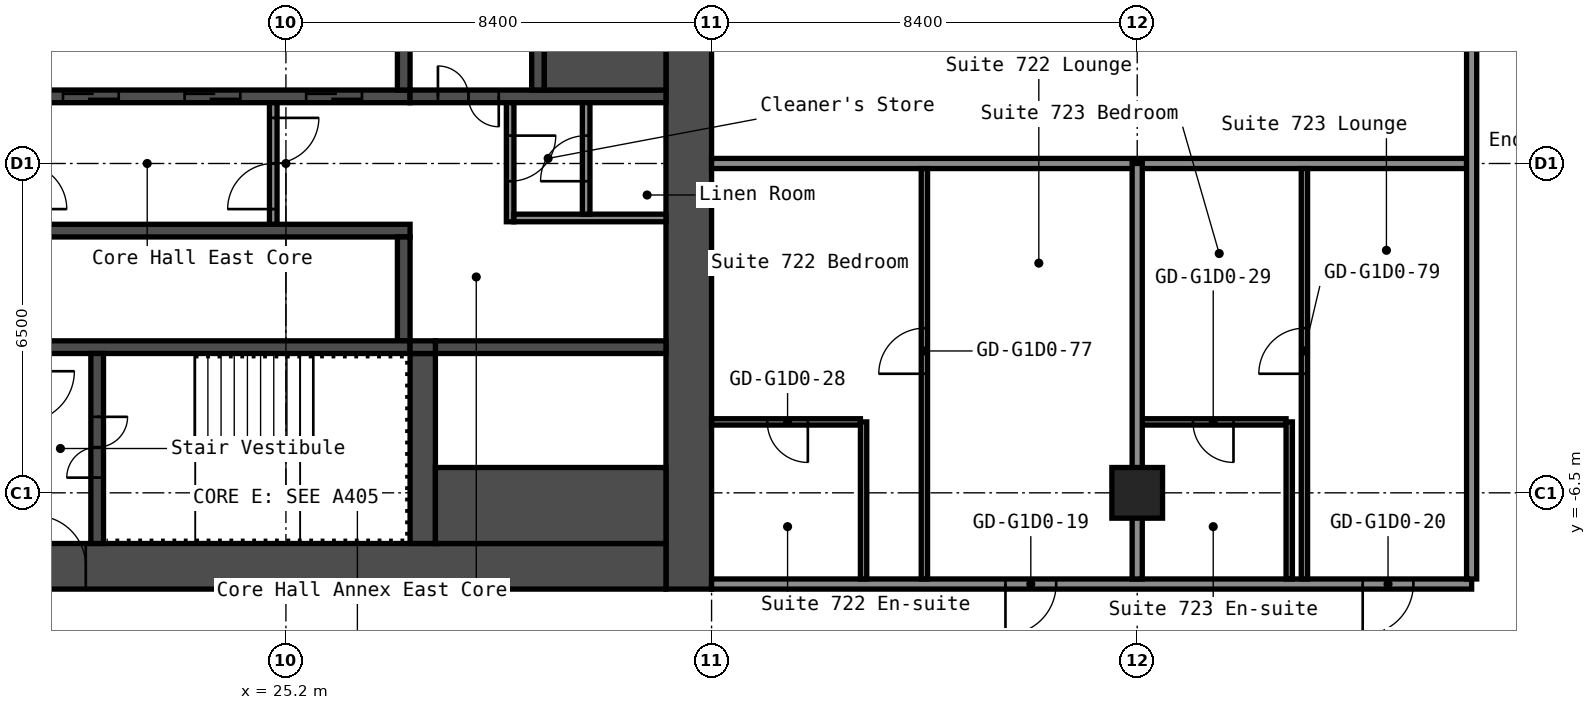
"""IFC4 building model, lengths in metres.
Left out: names, types, materials, properties, quantities, classifications, styles, units other than length and angle.
Written with IfcOpenShell. Run it as: python <this file> out.ifc"""

import sys

from ifc_helpers import new_model, si_unit, direction, frame, frame_2d, origin, origin_2d, place, context, subcontext, project, spatial, rectangle, hollow_rectangle, extrude, element, fill, save


model = new_model("IFC4")
c1 = context("Model", 3, precision=1e-05, world=origin(), true_north=direction((0.0, 1.0)))
c2 = subcontext(c1, "Body", "Model", "MODEL_VIEW")
j1 = project(units=[si_unit("LENGTHUNIT", "METRE"), si_unit("PLANEANGLEUNIT", "RADIAN")], contexts=[c1])
p1 = place(None, origin())
s1 = spatial("IfcSite", under=j1, at=p1, CompositionType="ELEMENT")
p2 = place(p1, origin())
s2 = spatial("IfcBuilding", under=s1, at=p2, CompositionType="ELEMENT")
p3 = place(p2, frame((0.0, 0.0, 29.4)))
s3 = spatial("IfcBuildingStorey", under=s2, at=p3, CompositionType="ELEMENT", Elevation=29.4)
p4 = place(p3, frame((42.0, -6.5, 0.0), z_axis=(0.0, 0.0, 1.0), x_axis=(1.0, 0.0, 0.0)))
e1 = element("IfcColumn", 1, at=p4, inside=s3, PredefinedType="COLUMN", context=c2, shape_type="SweptSolid", body=[
    extrude(hollow_rectangle(XDim=1.0, YDim=1.0, WallThickness=0.04, at=origin_2d()), origin(), (0.0, 0.0, 1.0), 2.8),
])
p5 = place(p3, frame((33.15, -8.4, 0.0), z_axis=(0.0, 0.0, 1.0), x_axis=(0.0, 1.0, 0.0)))
e2 = element("IfcWall", 2, at=p5, inside=s3, PredefinedType="SHEAR", context=c2, shape_type="SweptSolid", body=[
    extrude(rectangle(XDim=16.8, YDim=0.9, at=frame_2d((8.4, 0.0))), origin(), (0.0, 0.0, 1.0), 2.8),
])
p6 = place(p3, frame((17.7, -7.95, 0.0), z_axis=(0.0, 0.0, 1.0), x_axis=(1.0, 0.0, 0.0)))
e3 = element("IfcWall", 3, at=p6, inside=s3, PredefinedType="SHEAR", context=c2, shape_type="SweptSolid", body=[
    extrude(rectangle(XDim=15.0, YDim=0.9, at=frame_2d((7.5, 0.0))), origin(), (0.0, 0.0, 1.0), 2.8),
])
p7 = place(p6, frame((2.55, 0.0, 0.0)))
e4 = element("IfcOpeningElement", 4, at=p7, cuts=e3, PredefinedType="OPENING", context=c2, shape_type="SweptSolid", body=[
    extrude(rectangle(XDim=1.0, YDim=2.1, at=frame_2d((0.5, 1.05))), frame((0.0, 0.46, 0.0), z_axis=(0.0, -1.0, 0.0), x_axis=(1.0, 0.0, 0.0)), (0.0, 0.0, 1.0), 0.92),
])
p8 = place(p3, frame((20.15, 1.325, 0.0), z_axis=(0.0, 0.0, 1.0), x_axis=(1.0, 0.0, 0.0)))
e5 = element("IfcWall", 5, at=p8, inside=s3, PredefinedType="SHEAR", context=c2, shape_type="SweptSolid", body=[
    extrude(rectangle(XDim=7.5, YDim=0.25, at=frame_2d((3.75, 0.0))), origin(), (0.0, 0.0, 1.0), 2.8),
])
p9 = place(p8, frame((0.65, 0.0, 0.0)))
e6 = element("IfcOpeningElement", 6, at=p9, cuts=e5, PredefinedType="OPENING", context=c2, shape_type="SweptSolid", body=[
    extrude(rectangle(XDim=1.1, YDim=2.1, at=frame_2d((0.55, 1.05))), frame((0.0, 0.135, 0.0), z_axis=(0.0, -1.0, 0.0), x_axis=(1.0, 0.0, 0.0)), (0.0, 0.0, 1.0), 0.27),
])
p10 = place(p8, frame((3.05, 0.0, 0.0)))
e7 = element("IfcOpeningElement", 7, at=p10, cuts=e5, PredefinedType="OPENING", context=c2, shape_type="SweptSolid", body=[
    extrude(rectangle(XDim=1.1, YDim=2.1, at=frame_2d((0.55, 1.05))), frame((0.0, 0.135, 0.0), z_axis=(0.0, -1.0, 0.0), x_axis=(1.0, 0.0, 0.0)), (0.0, 0.0, 1.0), 0.27),
])
p11 = place(p8, frame((5.45, 0.0, 0.0)))
e8 = element("IfcOpeningElement", 8, at=p11, cuts=e5, PredefinedType="OPENING", context=c2, shape_type="SweptSolid", body=[
    extrude(rectangle(XDim=1.1, YDim=2.1, at=frame_2d((0.55, 1.05))), frame((0.0, 0.135, 0.0), z_axis=(0.0, -1.0, 0.0), x_axis=(1.0, 0.0, 0.0)), (0.0, 0.0, 1.0), 0.27),
])
p12 = place(p3, frame((27.525, 1.45, 0.0), z_axis=(0.0, 0.0, 1.0), x_axis=(0.0, 1.0, 0.0)))
e9 = element("IfcWall", 9, at=p12, inside=s3, PredefinedType="SHEAR", context=c2, shape_type="SweptSolid", body=[
    extrude(rectangle(XDim=2.05, YDim=0.25, at=frame_2d((1.025, 0.0))), origin(), (0.0, 0.0, 1.0), 2.8),
])
p13 = place(p3, frame((27.65, 1.325, 0.0), z_axis=(0.0, 0.0, 1.0), x_axis=(1.0, 0.0, 0.0)))
e10 = element("IfcWall", 10, at=p13, inside=s3, PredefinedType="SHEAR", context=c2, shape_type="SweptSolid", body=[
    extrude(rectangle(XDim=5.05, YDim=0.25, at=frame_2d((2.525, 0.0))), origin(), (0.0, 0.0, 1.0), 2.8),
])
p14 = place(p13, frame((0.55, 0.0, 0.0)))
e11 = element("IfcOpeningElement", 11, at=p14, cuts=e10, PredefinedType="OPENING", context=c2, shape_type="SweptSolid", body=[
    extrude(rectangle(XDim=1.2, YDim=2.1, at=frame_2d((0.6, 1.05))), frame((0.0, 0.135, 0.0), z_axis=(0.0, -1.0, 0.0), x_axis=(1.0, 0.0, 0.0)), (0.0, 0.0, 1.0), 0.27),
])
p15 = place(p3, frame((30.175, 1.45, 0.0), z_axis=(0.0, 0.0, 1.0), x_axis=(0.0, 1.0, 0.0)))
e12 = element("IfcWall", 12, at=p15, inside=s3, PredefinedType="SHEAR", context=c2, shape_type="SweptSolid", body=[
    extrude(rectangle(XDim=6.05, YDim=0.25, at=frame_2d((3.025, 0.0))), origin(), (0.0, 0.0, 1.0), 2.8),
])
p16 = place(p15, frame((2.625, 0.0, 0.0)))
e13 = element("IfcOpeningElement", 13, at=p16, cuts=e12, PredefinedType="OPENING", context=c2, shape_type="SweptSolid", body=[
    extrude(rectangle(XDim=1.1, YDim=2.1, at=frame_2d((0.55, 1.05))), frame((0.0, 0.135, 0.0), z_axis=(0.0, -1.0, 0.0), x_axis=(1.0, 0.0, 0.0)), (0.0, 0.0, 1.0), 0.27),
])
p17 = place(p3, frame((30.3, 2.375, 0.0), z_axis=(0.0, 0.0, 1.0), x_axis=(1.0, 0.0, 0.0)))
e14 = element("IfcWall", 14, at=p17, inside=s3, PredefinedType="SHEAR", context=c2, shape_type="SweptSolid", body=[
    extrude(rectangle(XDim=2.4, YDim=1.85, at=frame_2d((1.2, 0.0))), origin(), (0.0, 0.0, 1.0), 2.8),
])
p18 = place(p3, frame((20.15, -1.325, 0.0), z_axis=(0.0, 0.0, 1.0), x_axis=(1.0, 0.0, 0.0)))
e15 = element("IfcWall", 15, at=p18, inside=s3, PredefinedType="SHEAR", context=c2, shape_type="SweptSolid", body=[
    extrude(rectangle(XDim=7.5, YDim=0.25, at=frame_2d((3.75, 0.0))), origin(), (0.0, 0.0, 1.0), 2.8),
])
p19 = place(p3, frame((27.525, -3.5, 0.0), z_axis=(0.0, 0.0, 1.0), x_axis=(0.0, 1.0, 0.0)))
e16 = element("IfcWall", 16, at=p19, inside=s3, PredefinedType="SHEAR", context=c2, shape_type="SweptSolid", body=[
    extrude(rectangle(XDim=2.05, YDim=0.25, at=frame_2d((1.025, 0.0))), origin(), (0.0, 0.0, 1.0), 2.8),
])
p20 = place(p3, frame((20.15, -3.625, 0.0), z_axis=(0.0, 0.0, 1.0), x_axis=(1.0, 0.0, 0.0)))
e17 = element("IfcWall", 17, at=p20, inside=s3, PredefinedType="SHEAR", context=c2, shape_type="SweptSolid", body=[
    extrude(rectangle(XDim=7.5, YDim=0.25, at=frame_2d((3.75, 0.0))), origin(), (0.0, 0.0, 1.0), 2.8),
])
p21 = place(p3, frame((21.475, -7.5, 0.0), z_axis=(0.0, 0.0, 1.0), x_axis=(0.0, 1.0, 0.0)))
e18 = element("IfcWall", 18, at=p21, inside=s3, PredefinedType="SHEAR", context=c2, shape_type="SweptSolid", body=[
    extrude(rectangle(XDim=3.75, YDim=0.25, at=frame_2d((1.875, 0.0))), origin(), (0.0, 0.0, 1.0), 2.8),
])
p22 = place(p21, frame((1.3, 0.0, 0.0)))
e19 = element("IfcOpeningElement", 19, at=p22, cuts=e18, PredefinedType="OPENING", context=c2, shape_type="SweptSolid", body=[
    extrude(rectangle(XDim=1.2, YDim=2.1, at=frame_2d((0.6, 1.05))), frame((0.0, 0.135, 0.0), z_axis=(0.0, -1.0, 0.0), x_axis=(1.0, 0.0, 0.0)), (0.0, 0.0, 1.0), 0.27),
])
p23 = place(p3, frame((27.9, -7.5, 0.0), z_axis=(0.0, 0.0, 1.0), x_axis=(0.0, 1.0, 0.0)))
e20 = element("IfcWall", 20, at=p23, inside=s3, PredefinedType="SHEAR", context=c2, shape_type="SweptSolid", body=[
    extrude(rectangle(XDim=3.75, YDim=0.5, at=frame_2d((1.875, 0.0))), origin(), (0.0, 0.0, 1.0), 2.8),
])
p24 = place(p3, frame((28.15, -3.625, 0.0), z_axis=(0.0, 0.0, 1.0), x_axis=(1.0, 0.0, 0.0)))
e21 = element("IfcWall", 21, at=p24, inside=s3, PredefinedType="SHEAR", context=c2, shape_type="SweptSolid", body=[
    extrude(rectangle(XDim=4.55, YDim=0.25, at=frame_2d((2.275, 0.0))), origin(), (0.0, 0.0, 1.0), 2.8),
])
p25 = place(p3, frame((28.15, -6.75, 0.0), z_axis=(0.0, 0.0, 1.0), x_axis=(1.0, 0.0, 0.0)))
e22 = element("IfcWall", 22, at=p25, inside=s3, PredefinedType="SHEAR", context=c2, shape_type="SweptSolid", body=[
    extrude(rectangle(XDim=4.55, YDim=1.5, at=frame_2d((2.275, 0.0))), origin(), (0.0, 0.0, 1.0), 2.8),
])
p26 = place(p3, frame((27.65, -3.625, 0.0), z_axis=(0.0, 0.0, 1.0), x_axis=(1.0, 0.0, 0.0)))
e23 = element("IfcWall", 23, at=p26, inside=s3, PredefinedType="SHEAR", context=c2, shape_type="SweptSolid", body=[
    extrude(rectangle(XDim=0.5, YDim=0.25, at=frame_2d((0.25, 0.0))), origin(), (0.0, 0.0, 1.0), 2.8),
])
p27 = place(p3, frame((24.95, -1.2, 0.0), z_axis=(0.0, 0.0, 1.0), x_axis=(0.0, 1.0, 0.0)))
e24 = element("IfcWall", 24, at=p27, inside=s3, PredefinedType="PARTITIONING", context=c2, shape_type="SweptSolid", body=[
    extrude(rectangle(XDim=2.4, YDim=0.15, at=frame_2d((1.2, 0.0))), origin(), (0.0, 0.0, 1.0), 2.8),
])
p28 = place(p27, frame((0.3, 0.0, 0.0)))
e25 = element("IfcOpeningElement", 25, at=p28, cuts=e24, PredefinedType="OPENING", context=c2, shape_type="SweptSolid", body=[
    extrude(rectangle(XDim=1.8, YDim=2.1, at=frame_2d((0.9, 1.05))), frame((0.0, 0.085, 0.0), z_axis=(0.0, -1.0, 0.0), x_axis=(1.0, 0.0, 0.0)), (0.0, 0.0, 1.0), 0.17),
])
p29 = place(p3, frame((29.625, -1.15, 0.0), z_axis=(0.0, 0.0, 1.0), x_axis=(0.0, 1.0, 0.0)))
e26 = element("IfcWall", 26, at=p29, inside=s3, PredefinedType="PARTITIONING", context=c2, shape_type="SweptSolid", body=[
    extrude(rectangle(XDim=2.35, YDim=0.15, at=frame_2d((1.175, 0.0))), origin(), (0.0, 0.0, 1.0), 2.8),
])
p30 = place(p29, frame((0.8, 0.0, 0.0)))
e27 = element("IfcOpeningElement", 27, at=p30, cuts=e26, PredefinedType="OPENING", context=c2, shape_type="SweptSolid", body=[
    extrude(rectangle(XDim=0.9, YDim=2.1, at=frame_2d((0.45, 1.05))), frame((0.0, 0.085, 0.0), z_axis=(0.0, -1.0, 0.0), x_axis=(1.0, 0.0, 0.0)), (0.0, 0.0, 1.0), 0.17),
])
p31 = place(p3, frame((29.7, -1.075, 0.0), z_axis=(0.0, 0.0, 1.0), x_axis=(1.0, 0.0, 0.0)))
e28 = element("IfcWall", 28, at=p31, inside=s3, PredefinedType="PARTITIONING", context=c2, shape_type="SweptSolid", body=[
    extrude(rectangle(XDim=3.0, YDim=0.15, at=frame_2d((1.5, 0.0))), origin(), (0.0, 0.0, 1.0), 2.8),
])
p32 = place(p3, frame((31.125, -1.0, 0.0), z_axis=(0.0, 0.0, 1.0), x_axis=(0.0, 1.0, 0.0)))
e29 = element("IfcWall", 29, at=p32, inside=s3, PredefinedType="PARTITIONING", context=c2, shape_type="SweptSolid", body=[
    extrude(rectangle(XDim=2.2, YDim=0.15, at=frame_2d((1.1, 0.0))), origin(), (0.0, 0.0, 1.0), 2.8),
])
p33 = place(p32, frame((0.65, 0.0, 0.0)))
e30 = element("IfcOpeningElement", 30, at=p33, cuts=e29, PredefinedType="OPENING", context=c2, shape_type="SweptSolid", body=[
    extrude(rectangle(XDim=0.9, YDim=2.1, at=frame_2d((0.45, 1.05))), frame((0.0, 0.085, 0.0), z_axis=(0.0, -1.0, 0.0), x_axis=(1.0, 0.0, 0.0)), (0.0, 0.0, 1.0), 0.17),
])
p34 = place(p3, frame((33.6, -8.3, 0.0), z_axis=(0.0, 0.0, 1.0), x_axis=(1.0, 0.0, 0.0)))
e31 = element("IfcWall", 31, at=p34, inside=s3, PredefinedType="PARTITIONING", context=c2, shape_type="SweptSolid", body=[
    extrude(rectangle(XDim=15.0, YDim=0.2, at=frame_2d((7.5, 0.0))), origin(), (0.0, 0.0, 1.0), 2.8),
])
p35 = place(p34, frame((5.8, 0.0, 0.0)))
e32 = element("IfcOpeningElement", 32, at=p35, cuts=e31, PredefinedType="OPENING", context=c2, shape_type="SweptSolid", body=[
    extrude(rectangle(XDim=1.0, YDim=2.1, at=frame_2d((0.5, 1.05))), frame((0.0, 0.11, 0.0), z_axis=(0.0, -1.0, 0.0), x_axis=(1.0, 0.0, 0.0)), (0.0, 0.0, 1.0), 0.22),
])
p36 = place(p34, frame((12.85, 0.0, 0.0)))
e33 = element("IfcOpeningElement", 33, at=p36, cuts=e31, PredefinedType="OPENING", context=c2, shape_type="SweptSolid", body=[
    extrude(rectangle(XDim=1.0, YDim=2.1, at=frame_2d((0.5, 1.05))), frame((0.0, 0.11, 0.0), z_axis=(0.0, -1.0, 0.0), x_axis=(1.0, 0.0, 0.0)), (0.0, 0.0, 1.0), 0.22),
])
p37 = place(p3, frame((33.6, -5.1, 0.0), z_axis=(0.0, 0.0, 1.0), x_axis=(1.0, 0.0, 0.0)))
e34 = element("IfcWall", 34, at=p37, inside=s3, PredefinedType="PARTITIONING", context=c2, shape_type="SweptSolid", body=[
    extrude(rectangle(XDim=2.938, YDim=0.125, at=frame_2d((1.469, 0.0))), origin(), (0.0, 0.0, 1.0), 2.8),
])
p38 = place(p37, frame((1.1, 0.0, 0.0)))
e35 = element("IfcOpeningElement", 35, at=p38, cuts=e34, PredefinedType="OPENING", context=c2, shape_type="SweptSolid", body=[
    extrude(rectangle(XDim=0.8, YDim=2.1, at=frame_2d((0.4, 1.05))), frame((0.0, 0.073, 0.0), z_axis=(0.0, -1.0, 0.0), x_axis=(1.0, 0.0, 0.0)), (0.0, 0.0, 1.0), 0.145),
])
p39 = place(p3, frame((42.1, -5.1, 0.0), z_axis=(0.0, 0.0, 1.0), x_axis=(1.0, 0.0, 0.0)))
e36 = element("IfcWall", 36, at=p39, inside=s3, PredefinedType="PARTITIONING", context=c2, shape_type="SweptSolid", body=[
    extrude(rectangle(XDim=2.837, YDim=0.125, at=frame_2d((1.419, 0.0))), origin(), (0.0, 0.0, 1.0), 2.8),
])
p40 = place(p39, frame((1.0, 0.0, 0.0)))
e37 = element("IfcOpeningElement", 37, at=p40, cuts=e36, PredefinedType="OPENING", context=c2, shape_type="SweptSolid", body=[
    extrude(rectangle(XDim=0.8, YDim=2.1, at=frame_2d((0.4, 1.05))), frame((0.0, 0.073, 0.0), z_axis=(0.0, -1.0, 0.0), x_axis=(1.0, 0.0, 0.0)), (0.0, 0.0, 1.0), 0.145),
])
p41 = place(p3, frame((33.6, 0.0, 0.0), z_axis=(0.0, 0.0, 1.0), x_axis=(1.0, 0.0, 0.0)))
e38 = element("IfcWall", 38, at=p41, inside=s3, PredefinedType="PARTITIONING", context=c2, shape_type="SweptSolid", body=[
    extrude(rectangle(XDim=14.9, YDim=0.2, at=frame_2d((7.45, 0.0))), origin(), (0.0, 0.0, 1.0), 2.8),
])
p42 = place(p3, frame((36.6, -8.2, 0.0), z_axis=(0.0, 0.0, 1.0), x_axis=(0.0, 1.0, 0.0)))
e39 = element("IfcWall", 39, at=p42, inside=s3, PredefinedType="PARTITIONING", context=c2, shape_type="SweptSolid", body=[
    extrude(rectangle(XDim=3.1, YDim=0.125, at=frame_2d((1.55, 0.0))), origin(), (0.0, 0.0, 1.0), 2.8),
])
p43 = place(p3, frame((37.8, -8.2, 0.0), z_axis=(0.0, 0.0, 1.0), x_axis=(0.0, 1.0, 0.0)))
e40 = element("IfcWall", 40, at=p43, inside=s3, PredefinedType="PARTITIONING", context=c2, shape_type="SweptSolid", body=[
    extrude(rectangle(XDim=8.1, YDim=0.125, at=frame_2d((4.05, 0.0))), origin(), (0.0, 0.0, 1.0), 2.8),
])
p44 = place(p43, frame((4.05, 0.0, 0.0)))
e41 = element("IfcOpeningElement", 41, at=p44, cuts=e40, PredefinedType="OPENING", context=c2, shape_type="SweptSolid", body=[
    extrude(rectangle(XDim=0.9, YDim=2.1, at=frame_2d((0.45, 1.05))), frame((0.0, 0.073, 0.0), z_axis=(0.0, -1.0, 0.0), x_axis=(1.0, 0.0, 0.0)), (0.0, 0.0, 1.0), 0.145),
])
p45 = place(p3, frame((42.0, -8.2, 0.0), z_axis=(0.0, 0.0, 1.0), x_axis=(0.0, 1.0, 0.0)))
e42 = element("IfcWall", 42, at=p45, inside=s3, PredefinedType="PARTITIONING", context=c2, shape_type="SweptSolid", body=[
    extrude(rectangle(XDim=8.2, YDim=0.2, at=frame_2d((4.1, 0.0))), origin(), (0.0, 0.0, 1.0), 2.8),
])
p46 = place(p3, frame((45.0, -8.2, 0.0), z_axis=(0.0, 0.0, 1.0), x_axis=(0.0, 1.0, 0.0)))
e43 = element("IfcWall", 43, at=p46, inside=s3, PredefinedType="PARTITIONING", context=c2, shape_type="SweptSolid", body=[
    extrude(rectangle(XDim=3.1, YDim=0.125, at=frame_2d((1.55, 0.0))), origin(), (0.0, 0.0, 1.0), 2.8),
])
p47 = place(p3, frame((45.3, -8.2, 0.0), z_axis=(0.0, 0.0, 1.0), x_axis=(0.0, 1.0, 0.0)))
e44 = element("IfcWall", 44, at=p47, inside=s3, PredefinedType="PARTITIONING", context=c2, shape_type="SweptSolid", body=[
    extrude(rectangle(XDim=8.1, YDim=0.125, at=frame_2d((4.05, 0.0))), origin(), (0.0, 0.0, 1.0), 2.8),
])
p48 = place(p47, frame((4.05, 0.0, 0.0)))
e45 = element("IfcOpeningElement", 45, at=p48, cuts=e44, PredefinedType="OPENING", context=c2, shape_type="SweptSolid", body=[
    extrude(rectangle(XDim=0.9, YDim=2.1, at=frame_2d((0.45, 1.05))), frame((0.0, 0.073, 0.0), z_axis=(0.0, -1.0, 0.0), x_axis=(1.0, 0.0, 0.0)), (0.0, 0.0, 1.0), 0.145),
])
p49 = place(p3, frame((48.6, -8.2, 0.0), z_axis=(0.0, 0.0, 1.0), x_axis=(0.0, 1.0, 0.0)))
e46 = element("IfcWall", 46, at=p49, inside=s3, PredefinedType="PARTITIONING", context=c2, shape_type="SweptSolid", body=[
    extrude(rectangle(XDim=16.4, YDim=0.2, at=frame_2d((8.2, 0.0))), origin(), (0.0, 0.0, 1.0), 2.8),
])
p50 = place(p7, origin())
e47 = element("IfcDoor", 47, at=p50, inside=s3, OperationType="SINGLE_SWING_RIGHT", PredefinedType="DOOR", context=c2, shape_type="SweptSolid", body=[
    extrude(rectangle(XDim=1.0, YDim=2.1, at=frame_2d((0.5, 1.05))), frame((0.0, 0.025, 0.0), z_axis=(0.0, -1.0, 0.0), x_axis=(1.0, 0.0, 0.0)), (0.0, 0.0, 1.0), 0.05),
])
fill(e4, e47)
p51 = place(p22, origin())
e48 = element("IfcDoor", 48, at=p51, inside=s3, OperationType="DOUBLE_DOOR_SINGLE_SWING", PredefinedType="DOOR", context=c2, shape_type="SweptSolid", body=[
    extrude(rectangle(XDim=1.2, YDim=2.1, at=frame_2d((0.6, 1.05))), frame((0.0, 0.025, 0.0), z_axis=(0.0, -1.0, 0.0), x_axis=(1.0, 0.0, 0.0)), (0.0, 0.0, 1.0), 0.05),
])
fill(e19, e48)
p52 = place(p14, origin())
e49 = element("IfcDoor", 49, at=p52, inside=s3, OperationType="DOUBLE_DOOR_SINGLE_SWING", PredefinedType="DOOR", context=c2, shape_type="SweptSolid", body=[
    extrude(rectangle(XDim=1.2, YDim=2.1, at=frame_2d((0.6, 1.05))), frame((0.0, 0.025, 0.0), z_axis=(0.0, -1.0, 0.0), x_axis=(1.0, 0.0, 0.0)), (0.0, 0.0, 1.0), 0.05),
])
fill(e11, e49)
p53 = place(p28, origin())
e50 = element("IfcDoor", 50, at=p53, inside=s3, OperationType="DOUBLE_DOOR_SINGLE_SWING", PredefinedType="DOOR", context=c2, shape_type="SweptSolid", body=[
    extrude(rectangle(XDim=1.8, YDim=2.1, at=frame_2d((0.9, 1.05))), frame((0.0, 0.025, 0.0), z_axis=(0.0, -1.0, 0.0), x_axis=(1.0, 0.0, 0.0)), (0.0, 0.0, 1.0), 0.05),
])
fill(e25, e50)
p54 = place(p30, origin())
e51 = element("IfcDoor", 51, at=p54, inside=s3, OperationType="SINGLE_SWING_RIGHT", PredefinedType="DOOR", context=c2, shape_type="SweptSolid", body=[
    extrude(rectangle(XDim=0.9, YDim=2.1, at=frame_2d((0.45, 1.05))), frame((0.0, 0.025, 0.0), z_axis=(0.0, -1.0, 0.0), x_axis=(1.0, 0.0, 0.0)), (0.0, 0.0, 1.0), 0.05),
])
fill(e27, e51)
p55 = place(p33, origin())
e52 = element("IfcDoor", 52, at=p55, inside=s3, OperationType="SINGLE_SWING_RIGHT", PredefinedType="DOOR", context=c2, shape_type="SweptSolid", body=[
    extrude(rectangle(XDim=0.9, YDim=2.1, at=frame_2d((0.45, 1.05))), frame((0.0, 0.025, 0.0), z_axis=(0.0, -1.0, 0.0), x_axis=(1.0, 0.0, 0.0)), (0.0, 0.0, 1.0), 0.05),
])
fill(e30, e52)
p56 = place(p9, origin())
e53 = element("IfcDoor", 53, at=p56, inside=s3, OperationType="DOUBLE_DOOR_SLIDING", PredefinedType="DOOR", context=c2, shape_type="SweptSolid", body=[
    extrude(rectangle(XDim=1.1, YDim=2.1, at=frame_2d((0.55, 1.05))), frame((0.0, 0.025, 0.0), z_axis=(0.0, -1.0, 0.0), x_axis=(1.0, 0.0, 0.0)), (0.0, 0.0, 1.0), 0.05),
])
fill(e6, e53)
p57 = place(p10, origin())
e54 = element("IfcDoor", 54, at=p57, inside=s3, OperationType="DOUBLE_DOOR_SLIDING", PredefinedType="DOOR", context=c2, shape_type="SweptSolid", body=[
    extrude(rectangle(XDim=1.1, YDim=2.1, at=frame_2d((0.55, 1.05))), frame((0.0, 0.025, 0.0), z_axis=(0.0, -1.0, 0.0), x_axis=(1.0, 0.0, 0.0)), (0.0, 0.0, 1.0), 0.05),
])
fill(e7, e54)
p58 = place(p11, origin())
e55 = element("IfcDoor", 55, at=p58, inside=s3, OperationType="DOUBLE_DOOR_SLIDING", PredefinedType="DOOR", context=c2, shape_type="SweptSolid", body=[
    extrude(rectangle(XDim=1.1, YDim=2.1, at=frame_2d((0.55, 1.05))), frame((0.0, 0.025, 0.0), z_axis=(0.0, -1.0, 0.0), x_axis=(1.0, 0.0, 0.0)), (0.0, 0.0, 1.0), 0.05),
])
fill(e8, e55)
p59 = place(p35, origin())
e56 = element("IfcDoor", 56, at=p59, inside=s3, OperationType="SINGLE_SWING_LEFT", PredefinedType="DOOR", context=c2, shape_type="SweptSolid", body=[
    extrude(rectangle(XDim=1.0, YDim=2.1, at=frame_2d((0.5, 1.05))), frame((0.0, 0.025, 0.0), z_axis=(0.0, -1.0, 0.0), x_axis=(1.0, 0.0, 0.0)), (0.0, 0.0, 1.0), 0.05),
])
fill(e32, e56)
p60 = place(p36, origin())
e57 = element("IfcDoor", 57, at=p60, inside=s3, OperationType="SINGLE_SWING_LEFT", PredefinedType="DOOR", context=c2, shape_type="SweptSolid", body=[
    extrude(rectangle(XDim=1.0, YDim=2.1, at=frame_2d((0.5, 1.05))), frame((0.0, 0.025, 0.0), z_axis=(0.0, -1.0, 0.0), x_axis=(1.0, 0.0, 0.0)), (0.0, 0.0, 1.0), 0.05),
])
fill(e33, e57)
p61 = place(p38, origin())
e58 = element("IfcDoor", 58, at=p61, inside=s3, OperationType="SINGLE_SWING_RIGHT", PredefinedType="DOOR", context=c2, shape_type="SweptSolid", body=[
    extrude(rectangle(XDim=0.8, YDim=2.1, at=frame_2d((0.4, 1.05))), frame((0.0, 0.025, 0.0), z_axis=(0.0, -1.0, 0.0), x_axis=(1.0, 0.0, 0.0)), (0.0, 0.0, 1.0), 0.05),
])
fill(e35, e58)
p62 = place(p40, origin())
e59 = element("IfcDoor", 59, at=p62, inside=s3, OperationType="SINGLE_SWING_RIGHT", PredefinedType="DOOR", context=c2, shape_type="SweptSolid", body=[
    extrude(rectangle(XDim=0.8, YDim=2.1, at=frame_2d((0.4, 1.05))), frame((0.0, 0.025, 0.0), z_axis=(0.0, -1.0, 0.0), x_axis=(1.0, 0.0, 0.0)), (0.0, 0.0, 1.0), 0.05),
])
fill(e37, e59)
p63 = place(p44, origin())
e60 = element("IfcDoor", 60, at=p63, inside=s3, OperationType="SINGLE_SWING_RIGHT", PredefinedType="DOOR", context=c2, shape_type="SweptSolid", body=[
    extrude(rectangle(XDim=0.9, YDim=2.1, at=frame_2d((0.45, 1.05))), frame((0.0, 0.025, 0.0), z_axis=(0.0, -1.0, 0.0), x_axis=(1.0, 0.0, 0.0)), (0.0, 0.0, 1.0), 0.05),
])
fill(e41, e60)
p64 = place(p48, origin())
e61 = element("IfcDoor", 61, at=p64, inside=s3, OperationType="SINGLE_SWING_RIGHT", PredefinedType="DOOR", context=c2, shape_type="SweptSolid", body=[
    extrude(rectangle(XDim=0.9, YDim=2.1, at=frame_2d((0.45, 1.05))), frame((0.0, 0.025, 0.0), z_axis=(0.0, -1.0, 0.0), x_axis=(1.0, 0.0, 0.0)), (0.0, 0.0, 1.0), 0.05),
])
fill(e45, e61)
save(model, sys.argv[1])
